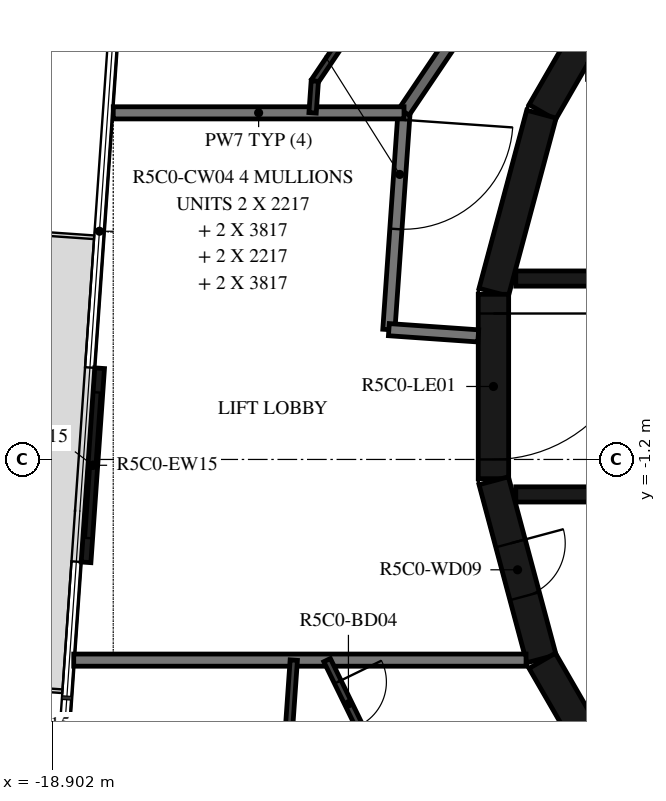
"""IFC4 building model, lengths in metres.
Left out: names, types, materials, properties, quantities, classifications, styles, units other than length and angle.
Written with IfcOpenShell. Run it as: python <this file> out.ifc"""

import sys

from ifc_helpers import new_model, si_unit, direction, frame, frame_2d, origin, place, context, subcontext, project, spatial, rectangle, extrude, element, fill, save


model = new_model("IFC4")
c1 = context("Model", 3, precision=1e-05, world=origin(), true_north=direction((0.0, 1.0)))
c2 = subcontext(c1, "Body", "Model", "MODEL_VIEW")
j1 = project(units=[si_unit("LENGTHUNIT", "METRE"), si_unit("PLANEANGLEUNIT", "RADIAN")], contexts=[c1])
p1 = place(None, origin())
s1 = spatial("IfcSite", under=j1, at=p1, CompositionType="ELEMENT")
p2 = place(p1, origin())
s2 = spatial("IfcBuilding", under=s1, at=p2, CompositionType="ELEMENT")
p3 = place(p2, frame((0.0, 0.0, 216.4)))
s3 = spatial("IfcBuildingStorey", under=s2, at=p3, CompositionType="ELEMENT", Elevation=216.4)
p4 = place(p3, frame((-18.124, 0.301, 0.0), z_axis=(0.0, 0.0, 1.0), x_axis=(-0.069728915792, -0.997565976917, 0.0)))
e1 = element("IfcWall", 1, at=p4, inside=s3, PredefinedType="STANDARD", context=c2, shape_type="SweptSolid", body=[
    extrude(rectangle(XDim=3.2, YDim=0.16, at=frame_2d((1.6, 0.0))), origin(), (0.0, 0.0, 1.0), 3.05),
])
p5 = place(p4, frame((0.4, 0.0, 0.0)))
e2 = element("IfcOpeningElement", 2, at=p5, cuts=e1, PredefinedType="OPENING", context=c2, shape_type="SweptSolid", body=[
    extrude(rectangle(XDim=2.4, YDim=2.4, at=frame_2d((1.2, 1.2))), frame((0.0, 0.09, 0.0), z_axis=(0.0, -1.0, 0.0), x_axis=(1.0, 0.0, 0.0)), (0.0, 0.0, 1.0), 0.18),
])
for number, where, z_axis, x_axis in (
    (3, (-9.329, 7.137, 0.0), (0.0, 0.0, 1.0), (-0.5, -0.866, 0.0)),
    (4, (-10.858, 4.479, 0.0), (0.0, 0.0, 1.0), (-0.259, -0.966, 0.0)),
):
    element("IfcWall", number, at=place(p3, frame(where, z_axis=z_axis, x_axis=x_axis)), inside=s3, PredefinedType="SHEAR", context=c2, shape_type="SweptSolid", body=[
        extrude(rectangle(XDim=3.033, YDim=0.5, at=frame_2d((1.516, 0.0))), origin(), (0.0, 0.0, 1.0), 3.05),
    ])
p6 = place(p3, frame((-11.647, 1.516, 0.0), z_axis=(0.0, 0.0, 1.0), x_axis=(0.0, -1.0, 0.0)))
e5 = element("IfcWall", 5, at=p6, inside=s3, PredefinedType="SHEAR", context=c2, shape_type="SweptSolid", body=[
    extrude(rectangle(XDim=3.033, YDim=0.5, at=frame_2d((1.516, 0.0))), origin(), (0.0, 0.0, 1.0), 3.05),
])
p7 = place(p6, frame((0.316, 0.0, 0.0)))
e6 = element("IfcOpeningElement", 6, at=p7, cuts=e5, PredefinedType="OPENING", context=c2, shape_type="SweptSolid", body=[
    extrude(rectangle(XDim=2.4, YDim=2.1, at=frame_2d((1.2, 1.05))), frame((0.0, 0.26, 0.0), z_axis=(0.0, -1.0, 0.0), x_axis=(1.0, 0.0, 0.0)), (0.0, 0.0, 1.0), 0.52),
])
p8 = place(p3, frame((-11.643, -1.55, 0.0), z_axis=(0.0, 0.0, 1.0), x_axis=(0.258734743916, -0.965948410781, 0.0)))
e7 = element("IfcWall", 7, at=p8, inside=s3, PredefinedType="SHEAR", context=c2, shape_type="SweptSolid", body=[
    extrude(rectangle(XDim=3.033, YDim=0.5, at=frame_2d((1.516, 0.0))), origin(), (0.0, 0.0, 1.0), 3.05),
])
p9 = place(p8, frame((1.066, 0.0, 0.0)))
e8 = element("IfcOpeningElement", 8, at=p9, cuts=e7, PredefinedType="OPENING", context=c2, shape_type="SweptSolid", body=[
    extrude(rectangle(XDim=0.9, YDim=2.1, at=frame_2d((0.45, 1.05))), frame((0.0, 0.26, 0.0), z_axis=(0.0, -1.0, 0.0), x_axis=(1.0, 0.0, 0.0)), (0.0, 0.0, 1.0), 0.52),
])
p10 = place(p3, frame((-10.845, -4.51, 0.0), z_axis=(0.0, 0.0, 1.0), x_axis=(0.500087131594, -0.865975092491, 0.0)))
e9 = element("IfcWall", 9, at=p10, inside=s3, PredefinedType="SHEAR", context=c2, shape_type="SweptSolid", body=[
    extrude(rectangle(XDim=3.033, YDim=0.5, at=frame_2d((1.516, 0.0))), origin(), (0.0, 0.0, 1.0), 3.05),
])
p11 = place(p3, frame((-11.28, 1.775, 0.0), z_axis=(0.0, 0.0, 1.0), x_axis=(1.0, 0.0, 0.0)))
e10 = element("IfcWall", 10, at=p11, inside=s3, PredefinedType="SHEAR", context=c2, shape_type="SweptSolid", body=[
    extrude(rectangle(XDim=14.38, YDim=0.25, at=frame_2d((7.19, 0.0))), origin(), (0.0, 0.0, 1.0), 3.05),
])
p12 = place(p11, frame((10.73, 0.0, 0.0)))
e11 = element("IfcOpeningElement", 11, at=p12, cuts=e10, PredefinedType="OPENING", context=c2, shape_type="SweptSolid", body=[
    extrude(rectangle(XDim=1.1, YDim=2.1, at=frame_2d((0.55, 1.05))), frame((0.0, 0.135, 0.0), z_axis=(0.0, -1.0, 0.0), x_axis=(1.0, 0.0, 0.0)), (0.0, 0.0, 1.0), 0.27),
])
p13 = place(p11, frame((12.88, 0.0, 0.0)))
e12 = element("IfcOpeningElement", 12, at=p13, cuts=e10, PredefinedType="OPENING", context=c2, shape_type="SweptSolid", body=[
    extrude(rectangle(XDim=1.1, YDim=2.1, at=frame_2d((0.55, 1.05))), frame((0.0, 0.135, 0.0), z_axis=(0.0, -1.0, 0.0), x_axis=(1.0, 0.0, 0.0)), (0.0, 0.0, 1.0), 0.27),
])
p14 = place(p11, frame((3.305, 0.0, 0.0)))
e13 = element("IfcOpeningElement", 13, at=p14, cuts=e10, PredefinedType="OPENING", context=c2, shape_type="SweptSolid", body=[
    extrude(rectangle(XDim=0.9, YDim=2.1, at=frame_2d((0.45, 1.05))), frame((0.0, 0.135, 0.0), z_axis=(0.0, -1.0, 0.0), x_axis=(1.0, 0.0, 0.0)), (0.0, 0.0, 1.0), 0.27),
])
p15 = place(p11, frame((7.605, 0.0, 0.0)))
e14 = element("IfcOpeningElement", 14, at=p15, cuts=e10, PredefinedType="OPENING", context=c2, shape_type="SweptSolid", body=[
    extrude(rectangle(XDim=0.9, YDim=2.1, at=frame_2d((0.45, 1.05))), frame((0.0, 0.135, 0.0), z_axis=(0.0, -1.0, 0.0), x_axis=(1.0, 0.0, 0.0)), (0.0, 0.0, 1.0), 0.27),
])
p16 = place(p3, frame((-11.28, -1.775, 0.0), z_axis=(0.0, 0.0, 1.0), x_axis=(1.0, 0.0, 0.0)))
e15 = element("IfcWall", 15, at=p16, inside=s3, PredefinedType="SHEAR", context=c2, shape_type="SweptSolid", body=[
    extrude(rectangle(XDim=14.38, YDim=0.25, at=frame_2d((7.19, 0.0))), origin(), (0.0, 0.0, 1.0), 3.05),
])
p17 = place(p16, frame((12.88, 0.0, 0.0)))
e16 = element("IfcOpeningElement", 16, at=p17, cuts=e15, PredefinedType="OPENING", context=c2, shape_type="SweptSolid", body=[
    extrude(rectangle(XDim=1.1, YDim=2.1, at=frame_2d((0.55, 1.05))), frame((0.0, 0.135, 0.0), z_axis=(0.0, -1.0, 0.0), x_axis=(1.0, 0.0, 0.0)), (0.0, 0.0, 1.0), 0.27),
])
p18 = place(p16, frame((8.68, 0.0, 0.0)))
e17 = element("IfcOpeningElement", 17, at=p18, cuts=e15, PredefinedType="OPENING", context=c2, shape_type="SweptSolid", body=[
    extrude(rectangle(XDim=0.9, YDim=2.1, at=frame_2d((0.45, 1.05))), frame((0.0, 0.135, 0.0), z_axis=(0.0, -1.0, 0.0), x_axis=(1.0, 0.0, 0.0)), (0.0, 0.0, 1.0), 0.27),
])
p19 = place(p3, frame((-13.118, 4.5, 0.0), z_axis=(0.0, 0.0, 1.0), x_axis=(-0.069746872611, -0.99756472159, 0.0)))
e18 = element("IfcWall", 18, at=p19, inside=s3, PredefinedType="STANDARD", context=c2, shape_type="SweptSolid", body=[
    extrude(rectangle(XDim=3.574, YDim=0.2, at=frame_2d((1.787, 0.0))), origin(), (0.0, 0.0, 1.0), 3.05),
])
p20 = place(p19, frame((0.115, 0.0, 0.0)))
e19 = element("IfcOpeningElement", 19, at=p20, cuts=e18, PredefinedType="OPENING", context=c2, shape_type="SweptSolid", body=[
    extrude(rectangle(XDim=1.8, YDim=2.1, at=frame_2d((0.9, 1.05))), frame((0.0, 0.11, 0.0), z_axis=(0.0, -1.0, 0.0), x_axis=(1.0, 0.0, 0.0)), (0.0, 0.0, 1.0), 0.22),
])
p21 = place(p3, frame((-13.367, 0.935, 0.0), z_axis=(0.0, 0.0, 1.0), x_axis=(0.997553656289, -0.069904955655, 0.0)))
e20 = element("IfcWall", 20, at=p21, inside=s3, PredefinedType="STANDARD", context=c2, shape_type="SweptSolid", body=[
    extrude(rectangle(XDim=1.474, YDim=0.2, at=frame_2d((0.737, 0.0))), origin(), (0.0, 0.0, 1.0), 3.05),
])
p22 = place(p3, frame((-9.101, 10.47, 0.0), z_axis=(0.0, 0.0, 1.0), x_axis=(-0.559195469534, -0.829035841718, 0.0)))
e21 = element("IfcWall", 21, at=p22, inside=s3, PredefinedType="STANDARD", context=c2, shape_type="SweptSolid", body=[
    extrude(rectangle(XDim=7.181, YDim=0.2, at=frame_2d((3.591, 0.0))), origin(), (0.0, 0.0, 1.0), 3.05),
])
p23 = place(p22, frame((1.0, 0.0, 0.0)))
e22 = element("IfcOpeningElement", 22, at=p23, cuts=e21, PredefinedType="OPENING", context=c2, shape_type="SweptSolid", body=[
    extrude(rectangle(XDim=1.0, YDim=2.1, at=frame_2d((0.5, 1.05))), frame((0.0, 0.11, 0.0), z_axis=(0.0, -1.0, 0.0), x_axis=(1.0, 0.0, 0.0)), (0.0, 0.0, 1.0), 0.22),
])
p24 = place(p3, frame((-13.118, 4.5, 0.0), z_axis=(0.0, 0.0, 1.0), x_axis=(-1.0, 0.0, 0.0)))
e23 = element("IfcWall", 23, at=p24, inside=s3, PredefinedType="STANDARD", context=c2, shape_type="SweptSolid", body=[
    extrude(rectangle(XDim=4.782, YDim=0.2, at=frame_2d((2.391, 0.0))), origin(), (0.0, 0.0, 1.0), 3.05),
])
p25 = place(p3, frame((-18.55, -4.5, 0.0), z_axis=(0.0, 0.0, 1.0), x_axis=(1.0, 0.0, 0.0)))
e24 = element("IfcWall", 24, at=p25, inside=s3, PredefinedType="STANDARD", context=c2, shape_type="SweptSolid", body=[
    extrude(rectangle(XDim=7.438, YDim=0.2, at=frame_2d((3.719, 0.0))), origin(), (0.0, 0.0, 1.0), 3.05),
])
p26 = place(p3, frame((-10.12, 11.642, 0.0), z_axis=(0.0, 0.0, 1.0), x_axis=(-0.55920080659, -0.829032241779, 0.0)))
e25 = element("IfcWall", 25, at=p26, inside=s3, PredefinedType="PARTITIONING", context=c2, shape_type="SweptSolid", body=[
    extrude(rectangle(XDim=7.985, YDim=0.12, at=frame_2d((3.992, 0.0))), origin(), (0.0, 0.0, 1.0), 3.05),
])
p27 = place(p26, frame((4.346, 0.0, 0.0)))
e26 = element("IfcOpeningElement", 26, at=p27, cuts=e25, PredefinedType="OPENING", context=c2, shape_type="SweptSolid", body=[
    extrude(rectangle(XDim=0.9, YDim=2.1, at=frame_2d((0.45, 1.05))), frame((0.0, 0.07, 0.0), z_axis=(0.0, -1.0, 0.0), x_axis=(1.0, 0.0, 0.0)), (0.0, 0.0, 1.0), 0.14),
])
p28 = place(p3, frame((-14.585, 5.022, 0.0), z_axis=(0.0, 0.0, 1.0), x_axis=(-0.069490327804, -0.997582625321, 0.0)))
e27 = element("IfcWall", 27, at=p28, inside=s3, PredefinedType="PARTITIONING", context=c2, shape_type="SweptSolid", body=[
    extrude(rectangle(XDim=0.523, YDim=0.12, at=frame_2d((0.262, 0.0))), origin(), (0.0, 0.0, 1.0), 3.05),
])
p29 = place(p3, frame((-14.383, -4.5, 0.0), z_axis=(0.0, 0.0, 1.0), x_axis=(0.438393414895, -0.898783185077, 0.0)))
e28 = element("IfcWall", 28, at=p29, inside=s3, PredefinedType="PARTITIONING", context=c2, shape_type="SweptSolid", body=[
    extrude(rectangle(XDim=6.049, YDim=0.12, at=frame_2d((3.024, 0.0))), origin(), (0.0, 0.0, 1.0), 3.05),
])
p30 = place(p29, frame((0.4, 0.0, 0.0)))
e29 = element("IfcOpeningElement", 29, at=p30, cuts=e28, PredefinedType="OPENING", context=c2, shape_type="SweptSolid", body=[
    extrude(rectangle(XDim=0.8, YDim=2.1, at=frame_2d((0.4, 1.05))), frame((0.0, 0.07, 0.0), z_axis=(0.0, -1.0, 0.0), x_axis=(1.0, 0.0, 0.0)), (0.0, 0.0, 1.0), 0.14),
])
p31 = place(p3, frame((-14.931, -4.5, 0.0), z_axis=(0.0, 0.0, 1.0), x_axis=(-0.069751708439, -0.997564383471, 0.0)))
e30 = element("IfcWall", 30, at=p31, inside=s3, PredefinedType="PARTITIONING", context=c2, shape_type="SweptSolid", body=[
    extrude(rectangle(XDim=11.894, YDim=0.12, at=frame_2d((5.947, 0.0))), origin(), (0.0, 0.0, 1.0), 3.05),
])
p32 = place(p31, frame((5.4, 0.0, 0.0)))
e31 = element("IfcOpeningElement", 31, at=p32, cuts=e30, PredefinedType="OPENING", context=c2, shape_type="SweptSolid", body=[
    extrude(rectangle(XDim=0.9, YDim=2.1, at=frame_2d((0.45, 1.05))), frame((0.0, 0.07, 0.0), z_axis=(0.0, -1.0, 0.0), x_axis=(1.0, 0.0, 0.0)), (0.0, 0.0, 1.0), 0.14),
])
p33 = place(p5, origin())
e32 = element("IfcDoor", 32, at=p33, inside=s3, OperationType="DOUBLE_DOOR_SLIDING", PredefinedType="DOOR", context=c2, shape_type="SweptSolid", body=[
    extrude(rectangle(XDim=2.4, YDim=2.4, at=frame_2d((1.2, 1.2))), frame((0.0, 0.025, 0.0), z_axis=(0.0, -1.0, 0.0), x_axis=(1.0, 0.0, 0.0)), (0.0, 0.0, 1.0), 0.05),
])
fill(e2, e32)
p34 = place(p7, origin())
e33 = element("IfcDoor", 33, at=p34, inside=s3, OperationType="DOUBLE_DOOR_SINGLE_SWING", PredefinedType="DOOR", context=c2, shape_type="SweptSolid", body=[
    extrude(rectangle(XDim=2.4, YDim=2.1, at=frame_2d((1.2, 1.05))), frame((0.0, 0.025, 0.0), z_axis=(0.0, -1.0, 0.0), x_axis=(1.0, 0.0, 0.0)), (0.0, 0.0, 1.0), 0.05),
])
fill(e6, e33)
p35 = place(p9, origin())
e34 = element("IfcDoor", 34, at=p35, inside=s3, OperationType="SINGLE_SWING_LEFT", PredefinedType="DOOR", context=c2, shape_type="SweptSolid", body=[
    extrude(rectangle(XDim=0.9, YDim=2.1, at=frame_2d((0.45, 1.05))), frame((0.0, 0.025, 0.0), z_axis=(0.0, -1.0, 0.0), x_axis=(1.0, 0.0, 0.0)), (0.0, 0.0, 1.0), 0.05),
])
fill(e8, e34)
p36 = place(p30, origin())
e35 = element("IfcDoor", 35, at=p36, inside=s3, OperationType="SINGLE_SWING_RIGHT", PredefinedType="DOOR", context=c2, shape_type="SweptSolid", body=[
    extrude(rectangle(XDim=0.8, YDim=2.1, at=frame_2d((0.4, 1.05))), frame((0.0, 0.025, 0.0), z_axis=(0.0, -1.0, 0.0), x_axis=(1.0, 0.0, 0.0)), (0.0, 0.0, 1.0), 0.05),
])
fill(e29, e35)
p37 = place(p20, origin())
e36 = element("IfcDoor", 36, at=p37, inside=s3, OperationType="DOUBLE_DOOR_SINGLE_SWING", PredefinedType="DOOR", context=c2, shape_type="SweptSolid", body=[
    extrude(rectangle(XDim=1.8, YDim=2.1, at=frame_2d((0.9, 1.05))), frame((0.0, 0.025, 0.0), z_axis=(0.0, -1.0, 0.0), x_axis=(1.0, 0.0, 0.0)), (0.0, 0.0, 1.0), 0.05),
])
fill(e19, e36)
save(model, sys.argv[1])
